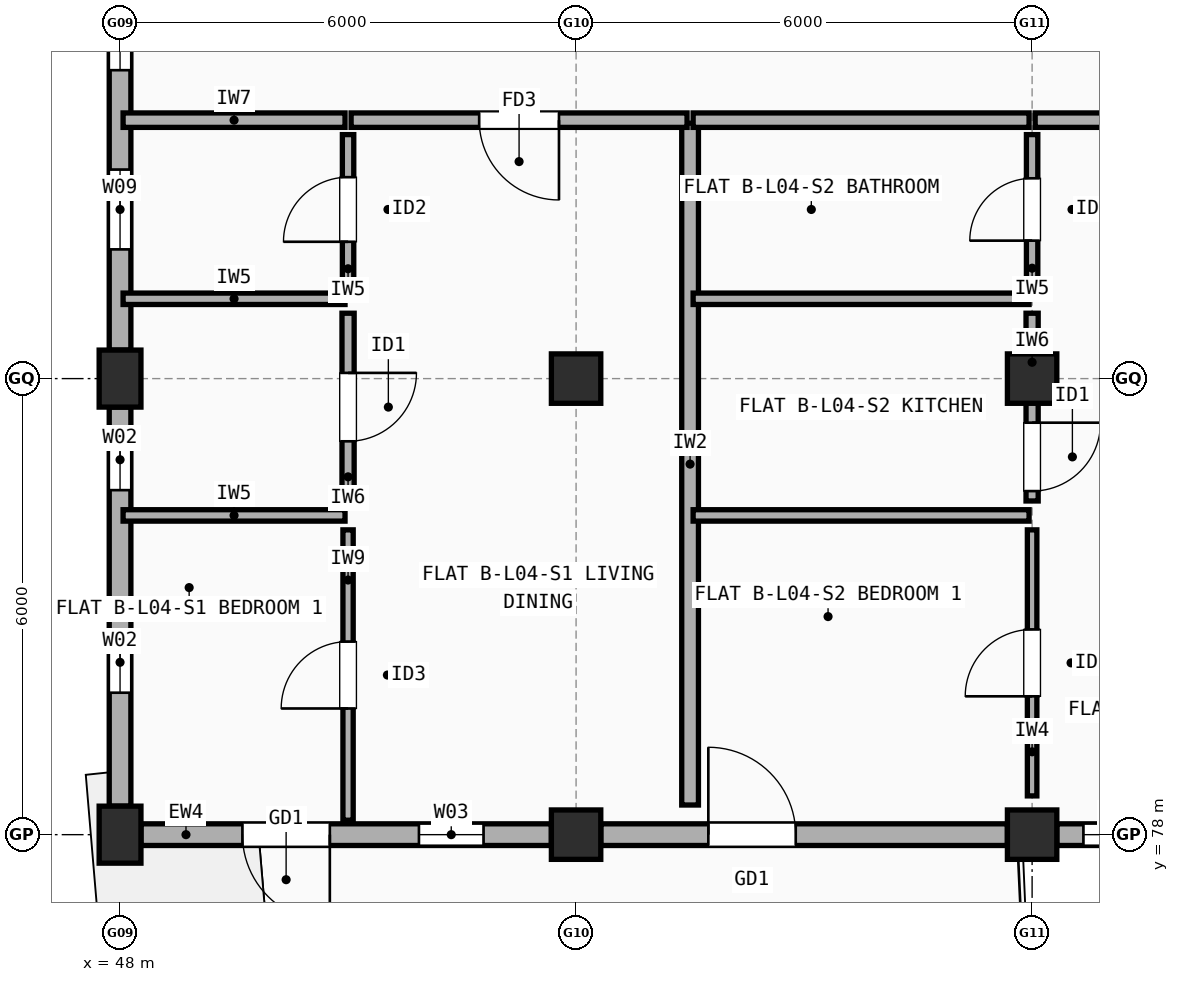
"""IFC4 building model, lengths in metres.
Left out: names, types, materials, properties, quantities, classifications, styles, units other than length and angle.
Written with IfcOpenShell. Run it as: python <this file> out.ifc"""

import sys

from ifc_helpers import new_model, si_unit, direction, frame, frame_2d, origin, origin_2d, place, context, subcontext, project, spatial, rectangle, extrude, element, fill, save


model = new_model("IFC4")
c1 = context("Model", 3, precision=1e-05, world=origin(), true_north=direction((0.0, 1.0)))
c2 = subcontext(c1, "Body", "Model", "MODEL_VIEW")
j1 = project(units=[si_unit("LENGTHUNIT", "METRE"), si_unit("PLANEANGLEUNIT", "RADIAN")], contexts=[c1])
p1 = place(None, origin())
s1 = spatial("IfcSite", under=j1, at=p1, CompositionType="ELEMENT")
p2 = place(p1, origin())
s2 = spatial("IfcBuilding", under=s1, at=p2, CompositionType="ELEMENT")
p3 = place(p2, frame((0.0, 0.0, 14.1)))
s3 = spatial("IfcBuildingStorey", under=s2, at=p3, CompositionType="ELEMENT", Elevation=14.1)
for number, where, z_axis, x_axis in (
    (1, (48.0, 78.0, 0.0), (0.0, 0.0, 1.0), (1.0, 0.0, 0.0)),
    (2, (48.0, 84.0, 0.0), (0.0, 0.0, 1.0), (1.0, 0.0, 0.0)),
):
    element("IfcColumn", number, at=place(p3, frame(where, z_axis=z_axis, x_axis=x_axis)), inside=s3, PredefinedType="COLUMN", context=c2, shape_type="SweptSolid", body=[
        extrude(rectangle(XDim=0.55, YDim=0.75, at=origin_2d()), origin(), (0.0, 0.0, 1.0), 2.95),
    ])
for number, where, z_axis, x_axis in (
    (3, (54.0, 78.0, 0.0), (0.0, 0.0, 1.0), (1.0, 0.0, 0.0)),
    (4, (54.0, 84.0, 0.0), (0.0, 0.0, 1.0), (1.0, 0.0, 0.0)),
    (5, (60.0, 78.0, 0.0), (0.0, 0.0, 1.0), (1.0, 0.0, 0.0)),
    (6, (60.0, 84.0, 0.0), (0.0, 0.0, 1.0), (1.0, 0.0, 0.0)),
):
    element("IfcColumn", number, at=place(p3, frame(where, z_axis=z_axis, x_axis=x_axis)), inside=s3, PredefinedType="COLUMN", context=c2, shape_type="SweptSolid", body=[
        extrude(rectangle(XDim=0.65, YDim=0.65, at=origin_2d()), origin(), (0.0, 0.0, 1.0), 2.95),
    ])
p4 = place(p3, frame((48.275, 78.0, 0.0), z_axis=(0.0, 0.0, 1.0), x_axis=(1.0, 0.0, 0.0)))
e7 = element("IfcWall", 7, at=p4, inside=s3, PredefinedType="STANDARD", context=c2, shape_type="SweptSolid", body=[
    extrude(rectangle(XDim=5.4, YDim=0.285, at=frame_2d((2.7, 0.0))), origin(), (0.0, 0.0, 1.0), 2.432),
])
p5 = place(p4, frame((1.335, 0.0, 0.0)))
e8 = element("IfcOpeningElement", 8, at=p5, cuts=e7, PredefinedType="OPENING", context=c2, shape_type="SweptSolid", body=[
    extrude(rectangle(XDim=1.15, YDim=2.15, at=frame_2d((0.575, 1.075))), frame((0.0, 0.152, 0.0), z_axis=(0.0, -1.0, 0.0), x_axis=(1.0, 0.0, 0.0)), (0.0, 0.0, 1.0), 0.305),
])
p6 = place(p4, frame((3.657, 0.0, 0.9)))
e9 = element("IfcOpeningElement", 9, at=p6, cuts=e7, PredefinedType="OPENING", context=c2, shape_type="SweptSolid", body=[
    extrude(rectangle(XDim=0.85, YDim=1.25, at=frame_2d((0.425, 0.625))), frame((0.0, 0.152, 0.0), z_axis=(0.0, -1.0, 0.0), x_axis=(1.0, 0.0, 0.0)), (0.0, 0.0, 1.0), 0.305),
])
p7 = place(p3, frame((54.325, 78.0, 0.0), z_axis=(0.0, 0.0, 1.0), x_axis=(1.0, 0.0, 0.0)))
e10 = element("IfcWall", 10, at=p7, inside=s3, PredefinedType="STANDARD", context=c2, shape_type="SweptSolid", body=[
    extrude(rectangle(XDim=5.35, YDim=0.285, at=frame_2d((2.675, 0.0))), origin(), (0.0, 0.0, 1.0), 2.432),
])
p8 = place(p7, frame((1.415, 0.0, 0.0)))
e11 = element("IfcOpeningElement", 11, at=p8, cuts=e10, PredefinedType="OPENING", context=c2, shape_type="SweptSolid", body=[
    extrude(rectangle(XDim=1.15, YDim=2.15, at=frame_2d((0.575, 1.075))), frame((0.0, 0.152, 0.0), z_axis=(0.0, -1.0, 0.0), x_axis=(1.0, 0.0, 0.0)), (0.0, 0.0, 1.0), 0.305),
])
p9 = place(p3, frame((60.325, 78.0, 0.0), z_axis=(0.0, 0.0, 1.0), x_axis=(1.0, 0.0, 0.0)))
e12 = element("IfcWall", 12, at=p9, inside=s3, PredefinedType="STANDARD", context=c2, shape_type="SweptSolid", body=[
    extrude(rectangle(XDim=5.35, YDim=0.285, at=frame_2d((2.675, 0.0))), origin(), (0.0, 0.0, 1.0), 2.432),
])
p10 = place(p9, frame((0.35, 0.0, 0.9)))
e13 = element("IfcOpeningElement", 13, at=p10, cuts=e12, PredefinedType="OPENING", context=c2, shape_type="SweptSolid", body=[
    extrude(rectangle(XDim=0.9, YDim=1.3, at=frame_2d((0.45, 0.65))), frame((0.0, 0.152, 0.0), z_axis=(0.0, -1.0, 0.0), x_axis=(1.0, 0.0, 0.0)), (0.0, 0.0, 1.0), 0.305),
])
p11 = place(p9, frame((2.885, 0.0, 0.9)))
e14 = element("IfcOpeningElement", 14, at=p11, cuts=e12, PredefinedType="OPENING", context=c2, shape_type="SweptSolid", body=[
    extrude(rectangle(XDim=0.9, YDim=1.3, at=frame_2d((0.45, 0.65))), frame((0.0, 0.152, 0.0), z_axis=(0.0, -1.0, 0.0), x_axis=(1.0, 0.0, 0.0)), (0.0, 0.0, 1.0), 0.305),
])
p12 = place(p3, frame((48.0, 89.625, 0.0), z_axis=(0.0, 0.0, 1.0), x_axis=(0.0, -1.0, 0.0)))
e15 = element("IfcWall", 15, at=p12, inside=s3, PredefinedType="STANDARD", context=c2, shape_type="SweptSolid", body=[
    extrude(rectangle(XDim=5.25, YDim=0.285, at=frame_2d((2.625, 0.0))), origin(), (0.0, 0.0, 1.0), 2.432),
])
p13 = place(p12, frame((0.617, 0.0, 0.9)))
e16 = element("IfcOpeningElement", 16, at=p13, cuts=e15, PredefinedType="OPENING", context=c2, shape_type="SweptSolid", body=[
    extrude(rectangle(XDim=0.95, YDim=1.35, at=frame_2d((0.475, 0.675))), frame((0.0, 0.152, 0.0), z_axis=(0.0, -1.0, 0.0), x_axis=(1.0, 0.0, 0.0)), (0.0, 0.0, 1.0), 0.305),
])
p14 = place(p12, frame((2.875, 0.0, 0.9)))
e17 = element("IfcOpeningElement", 17, at=p14, cuts=e15, PredefinedType="OPENING", context=c2, shape_type="SweptSolid", body=[
    extrude(rectangle(XDim=1.05, YDim=1.35, at=frame_2d((0.525, 0.675))), frame((0.0, 0.152, 0.0), z_axis=(0.0, -1.0, 0.0), x_axis=(1.0, 0.0, 0.0)), (0.0, 0.0, 1.0), 0.305),
])
p15 = place(p3, frame((48.0, 83.625, 0.0), z_axis=(0.0, 0.0, 1.0), x_axis=(0.0, -1.0, 0.0)))
e18 = element("IfcWall", 18, at=p15, inside=s3, PredefinedType="STANDARD", context=c2, shape_type="SweptSolid", body=[
    extrude(rectangle(XDim=5.25, YDim=0.285, at=frame_2d((2.625, 0.0))), origin(), (0.0, 0.0, 1.0), 2.432),
])
p16 = place(p15, frame((0.292, 0.0, 0.9)))
e19 = element("IfcOpeningElement", 19, at=p16, cuts=e18, PredefinedType="OPENING", context=c2, shape_type="SweptSolid", body=[
    extrude(rectangle(XDim=0.8, YDim=1.2, at=frame_2d((0.4, 0.6))), frame((0.0, 0.152, 0.0), z_axis=(0.0, -1.0, 0.0), x_axis=(1.0, 0.0, 0.0)), (0.0, 0.0, 1.0), 0.305),
])
p17 = place(p15, frame((2.958, 0.0, 0.9)))
e20 = element("IfcOpeningElement", 20, at=p17, cuts=e18, PredefinedType="OPENING", context=c2, shape_type="SweptSolid", body=[
    extrude(rectangle(XDim=0.8, YDim=1.2, at=frame_2d((0.4, 0.6))), frame((0.0, 0.152, 0.0), z_axis=(0.0, -1.0, 0.0), x_axis=(1.0, 0.0, 0.0)), (0.0, 0.0, 1.0), 0.305),
])
p18 = place(p3, frame((55.5, 78.39, 0.0), z_axis=(0.0, 0.0, 1.0), x_axis=(0.0, 1.0, 0.0)))
e21 = element("IfcWall", 21, at=p18, inside=s3, PredefinedType="SOLIDWALL", context=c2, shape_type="SweptSolid", body=[
    extrude(rectangle(XDim=8.97, YDim=0.22, at=frame_2d((4.485, 0.0))), origin(), (0.0, 0.0, 1.0), 2.432),
])
p19 = place(p3, frame((48.04, 87.4, 0.0), z_axis=(0.0, 0.0, 1.0), x_axis=(1.0, 0.0, 0.0)))
e22 = element("IfcWall", 22, at=p19, inside=s3, PredefinedType="SOLIDWALL", context=c2, shape_type="SweptSolid", body=[
    extrude(rectangle(XDim=2.92, YDim=0.19, at=frame_2d((1.46, 0.0))), origin(), (0.0, 0.0, 1.0), 2.432),
])
p20 = place(p3, frame((51.04, 87.4, 0.0), z_axis=(0.0, 0.0, 1.0), x_axis=(1.0, 0.0, 0.0)))
e23 = element("IfcWall", 23, at=p20, inside=s3, PredefinedType="SOLIDWALL", context=c2, shape_type="SweptSolid", body=[
    extrude(rectangle(XDim=4.42, YDim=0.19, at=frame_2d((2.21, 0.0))), origin(), (0.0, 0.0, 1.0), 2.548),
])
p21 = place(p20, frame((1.685, 0.0, 0.0)))
e24 = element("IfcOpeningElement", 24, at=p21, cuts=e23, PredefinedType="OPENING", context=c2, shape_type="SweptSolid", body=[
    extrude(rectangle(XDim=1.05, YDim=2.15, at=frame_2d((0.525, 1.075))), frame((0.0, 0.105, 0.0), z_axis=(0.0, -1.0, 0.0), x_axis=(1.0, 0.0, 0.0)), (0.0, 0.0, 1.0), 0.21),
])
p22 = place(p3, frame((51.0, 78.19, 0.0), z_axis=(0.0, 0.0, 1.0), x_axis=(0.0, 1.0, 0.0)))
e25 = element("IfcWall", 25, at=p22, inside=s3, PredefinedType="PARTITIONING", context=c2, shape_type="SweptSolid", body=[
    extrude(rectangle(XDim=3.82, YDim=0.135, at=frame_2d((1.91, 0.0))), origin(), (0.0, 0.0, 1.0), 2.95),
])
p23 = place(p22, frame((1.47, 0.0, 0.0)))
e26 = element("IfcOpeningElement", 26, at=p23, cuts=e25, PredefinedType="OPENING", context=c2, shape_type="SweptSolid", body=[
    extrude(rectangle(XDim=0.88, YDim=2.1, at=frame_2d((0.44, 1.05))), frame((0.0, 0.077, 0.0), z_axis=(0.0, -1.0, 0.0), x_axis=(1.0, 0.0, 0.0)), (0.0, 0.0, 1.0), 0.155),
])
p24 = place(p3, frame((51.0, 82.39, 0.0), z_axis=(0.0, 0.0, 1.0), x_axis=(0.0, 1.0, 0.0)))
e27 = element("IfcWall", 27, at=p24, inside=s3, PredefinedType="PLUMBINGWALL", context=c2, shape_type="SweptSolid", body=[
    extrude(rectangle(XDim=2.47, YDim=0.16, at=frame_2d((1.235, 0.0))), origin(), (0.0, 0.0, 1.0), 2.432),
])
p25 = place(p24, frame((0.785, 0.0, 0.0)))
e28 = element("IfcOpeningElement", 28, at=p25, cuts=e27, PredefinedType="OPENING", context=c2, shape_type="SweptSolid", body=[
    extrude(rectangle(XDim=0.9, YDim=2.1, at=frame_2d((0.45, 1.05))), frame((0.0, 0.09, 0.0), z_axis=(0.0, -1.0, 0.0), x_axis=(1.0, 0.0, 0.0)), (0.0, 0.0, 1.0), 0.18),
])
p26 = place(p3, frame((51.0, 85.24, 0.0), z_axis=(0.0, 0.0, 1.0), x_axis=(0.0, 1.0, 0.0)))
e29 = element("IfcWall", 29, at=p26, inside=s3, PredefinedType="PARTITIONING", context=c2, shape_type="SweptSolid", body=[
    extrude(rectangle(XDim=1.97, YDim=0.15, at=frame_2d((0.985, 0.0))), origin(), (0.0, 0.0, 1.0), 2.95),
])
p27 = place(p26, frame((0.56, 0.0, 0.0)))
e30 = element("IfcOpeningElement", 30, at=p27, cuts=e29, PredefinedType="OPENING", context=c2, shape_type="SweptSolid", body=[
    extrude(rectangle(XDim=0.85, YDim=2.1, at=frame_2d((0.425, 1.05))), frame((0.0, 0.085, 0.0), z_axis=(0.0, -1.0, 0.0), x_axis=(1.0, 0.0, 0.0)), (0.0, 0.0, 1.0), 0.17),
])
for number, where, z_axis, x_axis in (
    (31, (48.04, 82.2, 0.0), (0.0, 0.0, 1.0), (1.0, 0.0, 0.0)),
    (32, (48.04, 85.05, 0.0), (0.0, 0.0, 1.0), (1.0, 0.0, 0.0)),
):
    element("IfcWall", number, at=place(p3, frame(where, z_axis=z_axis, x_axis=x_axis)), inside=s3, PredefinedType="PARTITIONING", context=c2, shape_type="SweptSolid", body=[
        extrude(rectangle(XDim=2.92, YDim=0.15, at=frame_2d((1.46, 0.0))), origin(), (0.0, 0.0, 1.0), 2.432),
    ])
p28 = place(p3, frame((55.54, 87.4, 0.0), z_axis=(0.0, 0.0, 1.0), x_axis=(1.0, 0.0, 0.0)))
e33 = element("IfcWall", 33, at=p28, inside=s3, PredefinedType="SOLIDWALL", context=c2, shape_type="SweptSolid", body=[
    extrude(rectangle(XDim=4.42, YDim=0.19, at=frame_2d((2.21, 0.0))), origin(), (0.0, 0.0, 1.0), 2.508),
])
p29 = place(p3, frame((60.04, 87.4, 0.0), z_axis=(0.0, 0.0, 1.0), x_axis=(1.0, 0.0, 0.0)))
e34 = element("IfcWall", 34, at=p29, inside=s3, PredefinedType="SOLIDWALL", context=c2, shape_type="SweptSolid", body=[
    extrude(rectangle(XDim=4.42, YDim=0.19, at=frame_2d((2.21, 0.0))), origin(), (0.0, 0.0, 1.0), 2.508),
])
p30 = place(p29, frame((1.71, 0.0, 0.0)))
e35 = element("IfcOpeningElement", 35, at=p30, cuts=e34, PredefinedType="OPENING", context=c2, shape_type="SweptSolid", body=[
    extrude(rectangle(XDim=1.0, YDim=2.15, at=frame_2d((0.5, 1.075))), frame((0.0, 0.105, 0.0), z_axis=(0.0, -1.0, 0.0), x_axis=(1.0, 0.0, 0.0)), (0.0, 0.0, 1.0), 0.21),
])
p31 = place(p3, frame((60.0, 78.51, 0.0), z_axis=(0.0, 0.0, 1.0), x_axis=(0.0, 1.0, 0.0)))
e36 = element("IfcWall", 36, at=p31, inside=s3, PredefinedType="PARTITIONING", context=c2, shape_type="SweptSolid", body=[
    extrude(rectangle(XDim=3.5, YDim=0.125, at=frame_2d((1.75, 0.0))), origin(), (0.0, 0.0, 1.0), 2.548),
])
p32 = place(p31, frame((1.31, 0.0, 0.0)))
e37 = element("IfcOpeningElement", 37, at=p32, cuts=e36, PredefinedType="OPENING", context=c2, shape_type="SweptSolid", body=[
    extrude(rectangle(XDim=0.88, YDim=2.1, at=frame_2d((0.44, 1.05))), frame((0.0, 0.073, 0.0), z_axis=(0.0, -1.0, 0.0), x_axis=(1.0, 0.0, 0.0)), (0.0, 0.0, 1.0), 0.145),
])
p33 = place(p3, frame((60.0, 82.39, 0.0), z_axis=(0.0, 0.0, 1.0), x_axis=(0.0, 1.0, 0.0)))
e38 = element("IfcWall", 38, at=p33, inside=s3, PredefinedType="PLUMBINGWALL", context=c2, shape_type="SweptSolid", body=[
    extrude(rectangle(XDim=2.47, YDim=0.16, at=frame_2d((1.235, 0.0))), origin(), (0.0, 0.0, 1.0), 2.508),
])
p34 = place(p33, frame((0.13, 0.0, 0.0)))
e39 = element("IfcOpeningElement", 39, at=p34, cuts=e38, PredefinedType="OPENING", context=c2, shape_type="SweptSolid", body=[
    extrude(rectangle(XDim=0.9, YDim=2.1, at=frame_2d((0.45, 1.05))), frame((0.0, 0.09, 0.0), z_axis=(0.0, -1.0, 0.0), x_axis=(1.0, 0.0, 0.0)), (0.0, 0.0, 1.0), 0.18),
])
p35 = place(p3, frame((60.0, 85.24, 0.0), z_axis=(0.0, 0.0, 1.0), x_axis=(0.0, 1.0, 0.0)))
e40 = element("IfcWall", 40, at=p35, inside=s3, PredefinedType="PARTITIONING", context=c2, shape_type="SweptSolid", body=[
    extrude(rectangle(XDim=1.97, YDim=0.15, at=frame_2d((0.985, 0.0))), origin(), (0.0, 0.0, 1.0), 2.508),
])
p36 = place(p35, frame((0.575, 0.0, 0.0)))
e41 = element("IfcOpeningElement", 41, at=p36, cuts=e40, PredefinedType="OPENING", context=c2, shape_type="SweptSolid", body=[
    extrude(rectangle(XDim=0.82, YDim=2.08, at=frame_2d((0.41, 1.04))), frame((0.0, 0.085, 0.0), z_axis=(0.0, -1.0, 0.0), x_axis=(1.0, 0.0, 0.0)), (0.0, 0.0, 1.0), 0.17),
])
p37 = place(p3, frame((55.54, 82.2, 0.0), z_axis=(0.0, 0.0, 1.0), x_axis=(1.0, 0.0, 0.0)))
e42 = element("IfcWall", 42, at=p37, inside=s3, PredefinedType="PARTITIONING", context=c2, shape_type="SweptSolid", body=[
    extrude(rectangle(XDim=4.42, YDim=0.15, at=frame_2d((2.21, 0.0))), origin(), (0.0, 0.0, 1.0), 2.548),
])
p38 = place(p3, frame((55.54, 85.05, 0.0), z_axis=(0.0, 0.0, 1.0), x_axis=(1.0, 0.0, 0.0)))
e43 = element("IfcWall", 43, at=p38, inside=s3, PredefinedType="PARTITIONING", context=c2, shape_type="SweptSolid", body=[
    extrude(rectangle(XDim=4.42, YDim=0.15, at=frame_2d((2.21, 0.0))), origin(), (0.0, 0.0, 1.0), 2.508),
])
p39 = place(p5, frame((1.15, 0.0, 0.0), z_axis=(0.0, 0.0, 1.0), x_axis=(-1.0, 0.0, 0.0)))
e44 = element("IfcDoor", 44, at=p39, inside=s3, OperationType="SINGLE_SWING_RIGHT", PredefinedType="DOOR", context=c2, shape_type="SweptSolid", body=[
    extrude(rectangle(XDim=1.15, YDim=2.15, at=frame_2d((0.575, 1.075))), frame((0.0, 0.025, 0.0), z_axis=(0.0, -1.0, 0.0), x_axis=(1.0, 0.0, 0.0)), (0.0, 0.0, 1.0), 0.05),
])
fill(e8, e44)
p40 = place(p6, origin())
e45 = element("IfcWindow", 45, at=p40, inside=s3, PartitioningType="SINGLE_PANEL", PredefinedType="WINDOW", context=c2, shape_type="SweptSolid", body=[
    extrude(rectangle(XDim=0.85, YDim=1.25, at=frame_2d((0.425, 0.625))), frame((0.0, 0.03, 0.0), z_axis=(0.0, -1.0, 0.0), x_axis=(1.0, 0.0, 0.0)), (0.0, 0.0, 1.0), 0.06),
])
fill(e9, e45)
p41 = place(p8, frame((1.15, 0.0, 0.0), z_axis=(0.0, 0.0, 1.0), x_axis=(-1.0, 0.0, 0.0)))
e46 = element("IfcDoor", 46, at=p41, inside=s3, OperationType="SINGLE_SWING_LEFT", PredefinedType="DOOR", context=c2, shape_type="SweptSolid", body=[
    extrude(rectangle(XDim=1.15, YDim=2.15, at=frame_2d((0.575, 1.075))), frame((0.0, 0.025, 0.0), z_axis=(0.0, -1.0, 0.0), x_axis=(1.0, 0.0, 0.0)), (0.0, 0.0, 1.0), 0.05),
])
fill(e11, e46)
p42 = place(p10, origin())
e47 = element("IfcWindow", 47, at=p42, inside=s3, PartitioningType="SINGLE_PANEL", PredefinedType="WINDOW", context=c2, shape_type="SweptSolid", body=[
    extrude(rectangle(XDim=0.9, YDim=1.3, at=frame_2d((0.45, 0.65))), frame((0.0, 0.03, 0.0), z_axis=(0.0, -1.0, 0.0), x_axis=(1.0, 0.0, 0.0)), (0.0, 0.0, 1.0), 0.06),
])
fill(e13, e47)
p43 = place(p13, origin())
e48 = element("IfcWindow", 48, at=p43, inside=s3, PartitioningType="SINGLE_PANEL", PredefinedType="WINDOW", context=c2, shape_type="SweptSolid", body=[
    extrude(rectangle(XDim=0.95, YDim=1.35, at=frame_2d((0.475, 0.675))), frame((0.0, 0.03, 0.0), z_axis=(0.0, -1.0, 0.0), x_axis=(1.0, 0.0, 0.0)), (0.0, 0.0, 1.0), 0.06),
])
fill(e16, e48)
p44 = place(p14, origin())
e49 = element("IfcWindow", 49, at=p44, inside=s3, PartitioningType="SINGLE_PANEL", PredefinedType="WINDOW", context=c2, shape_type="SweptSolid", body=[
    extrude(rectangle(XDim=1.05, YDim=1.35, at=frame_2d((0.525, 0.675))), frame((0.0, 0.03, 0.0), z_axis=(0.0, -1.0, 0.0), x_axis=(1.0, 0.0, 0.0)), (0.0, 0.0, 1.0), 0.06),
])
fill(e17, e49)
p45 = place(p16, origin())
e50 = element("IfcWindow", 50, at=p45, inside=s3, PartitioningType="SINGLE_PANEL", PredefinedType="WINDOW", context=c2, shape_type="SweptSolid", body=[
    extrude(rectangle(XDim=0.8, YDim=1.2, at=frame_2d((0.4, 0.6))), frame((0.0, 0.03, 0.0), z_axis=(0.0, -1.0, 0.0), x_axis=(1.0, 0.0, 0.0)), (0.0, 0.0, 1.0), 0.06),
])
fill(e19, e50)
p46 = place(p17, origin())
e51 = element("IfcWindow", 51, at=p46, inside=s3, PartitioningType="SINGLE_PANEL", PredefinedType="WINDOW", context=c2, shape_type="SweptSolid", body=[
    extrude(rectangle(XDim=0.8, YDim=1.2, at=frame_2d((0.4, 0.6))), frame((0.0, 0.03, 0.0), z_axis=(0.0, -1.0, 0.0), x_axis=(1.0, 0.0, 0.0)), (0.0, 0.0, 1.0), 0.06),
])
fill(e20, e51)
p47 = place(p21, origin())
e52 = element("IfcDoor", 52, at=p47, inside=s3, OperationType="SINGLE_SWING_RIGHT", PredefinedType="DOOR", context=c2, shape_type="SweptSolid", body=[
    extrude(rectangle(XDim=1.05, YDim=2.15, at=frame_2d((0.525, 1.075))), frame((0.0, 0.025, 0.0), z_axis=(0.0, -1.0, 0.0), x_axis=(1.0, 0.0, 0.0)), (0.0, 0.0, 1.0), 0.05),
])
fill(e24, e52)
p48 = place(p23, origin())
e53 = element("IfcDoor", 53, at=p48, inside=s3, OperationType="SINGLE_SWING_LEFT", PredefinedType="DOOR", context=c2, shape_type="SweptSolid", body=[
    extrude(rectangle(XDim=0.88, YDim=2.1, at=frame_2d((0.44, 1.05))), frame((0.0, 0.025, 0.0), z_axis=(0.0, -1.0, 0.0), x_axis=(1.0, 0.0, 0.0)), (0.0, 0.0, 1.0), 0.05),
])
fill(e26, e53)
p49 = place(p25, origin())
e54 = element("IfcDoor", 54, at=p49, inside=s3, OperationType="SINGLE_SWING_RIGHT", PredefinedType="DOOR", context=c2, shape_type="SweptSolid", body=[
    extrude(rectangle(XDim=0.9, YDim=2.1, at=frame_2d((0.45, 1.05))), frame((0.0, 0.025, 0.0), z_axis=(0.0, -1.0, 0.0), x_axis=(1.0, 0.0, 0.0)), (0.0, 0.0, 1.0), 0.05),
])
fill(e28, e54)
p50 = place(p27, origin())
e55 = element("IfcDoor", 55, at=p50, inside=s3, OperationType="SINGLE_SWING_LEFT", PredefinedType="DOOR", context=c2, shape_type="SweptSolid", body=[
    extrude(rectangle(XDim=0.85, YDim=2.1, at=frame_2d((0.425, 1.05))), frame((0.0, 0.025, 0.0), z_axis=(0.0, -1.0, 0.0), x_axis=(1.0, 0.0, 0.0)), (0.0, 0.0, 1.0), 0.05),
])
fill(e30, e55)
p51 = place(p32, origin())
e56 = element("IfcDoor", 56, at=p51, inside=s3, OperationType="SINGLE_SWING_LEFT", PredefinedType="DOOR", context=c2, shape_type="SweptSolid", body=[
    extrude(rectangle(XDim=0.88, YDim=2.1, at=frame_2d((0.44, 1.05))), frame((0.0, 0.025, 0.0), z_axis=(0.0, -1.0, 0.0), x_axis=(1.0, 0.0, 0.0)), (0.0, 0.0, 1.0), 0.05),
])
fill(e37, e56)
p52 = place(p34, origin())
e57 = element("IfcDoor", 57, at=p52, inside=s3, OperationType="SINGLE_SWING_RIGHT", PredefinedType="DOOR", context=c2, shape_type="SweptSolid", body=[
    extrude(rectangle(XDim=0.9, YDim=2.1, at=frame_2d((0.45, 1.05))), frame((0.0, 0.025, 0.0), z_axis=(0.0, -1.0, 0.0), x_axis=(1.0, 0.0, 0.0)), (0.0, 0.0, 1.0), 0.05),
])
fill(e39, e57)
p53 = place(p36, origin())
e58 = element("IfcDoor", 58, at=p53, inside=s3, OperationType="SINGLE_SWING_LEFT", PredefinedType="DOOR", context=c2, shape_type="SweptSolid", body=[
    extrude(rectangle(XDim=0.82, YDim=2.08, at=frame_2d((0.41, 1.04))), frame((0.0, 0.025, 0.0), z_axis=(0.0, -1.0, 0.0), x_axis=(1.0, 0.0, 0.0)), (0.0, 0.0, 1.0), 0.05),
])
fill(e41, e58)
save(model, sys.argv[1])
